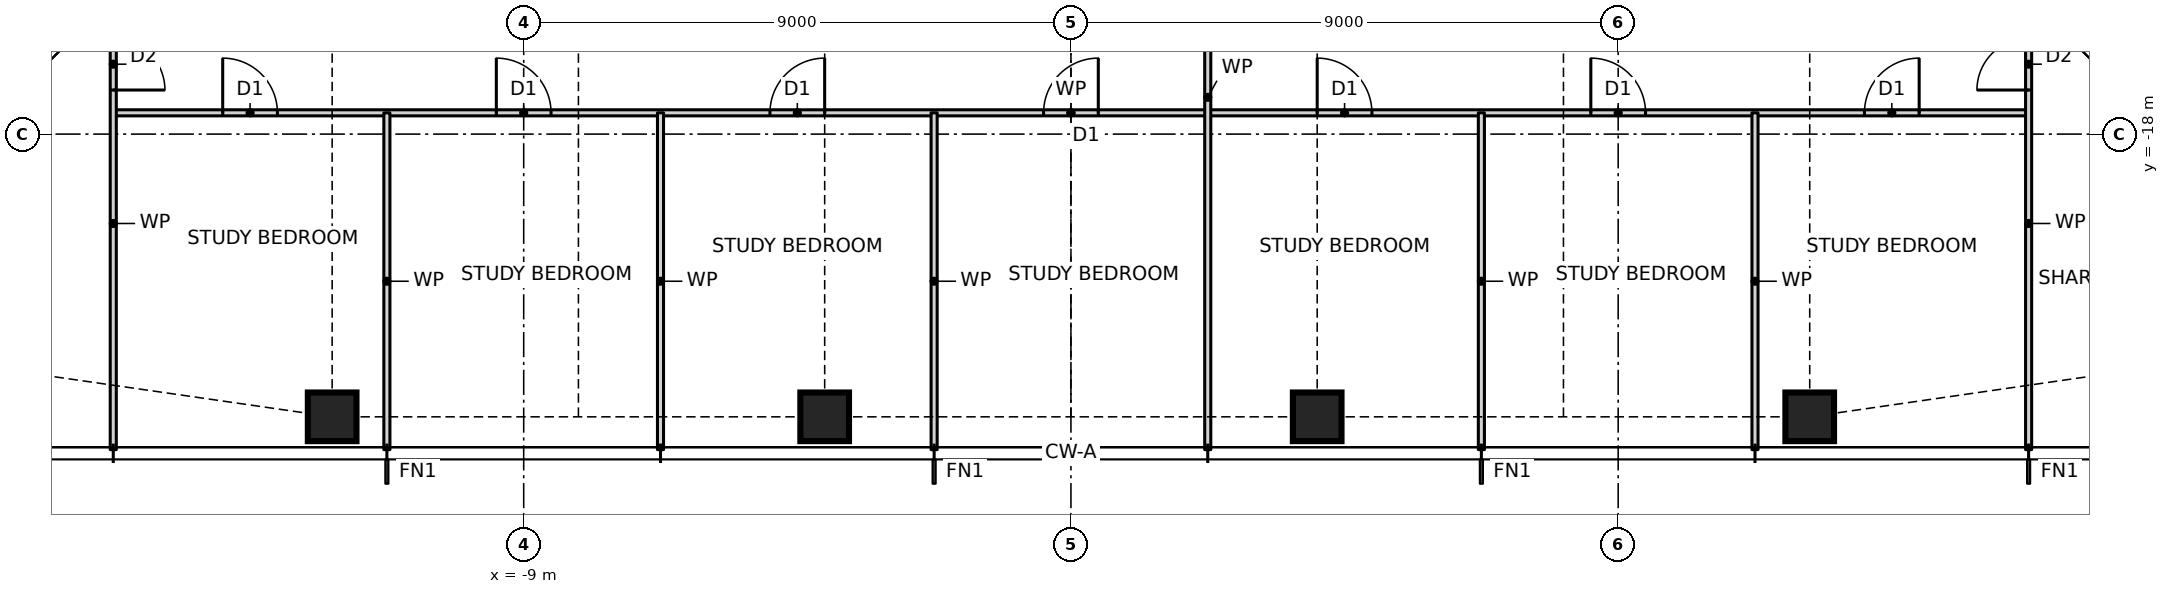
"""IFC4 building model, lengths in metres.
Left out: names, types, materials, properties, quantities, classifications, styles, units other than length and angle.
Written with IfcOpenShell. Run it as: python <this file> out.ifc"""

import sys

from ifc_helpers import new_model, si_unit, direction, frame, frame_2d, origin, origin_2d, place, context, subcontext, project, spatial, rectangle, hollow_rectangle, extrude, element, fill, save


model = new_model("IFC4")
c1 = context("Model", 3, precision=1e-05, world=origin(), true_north=direction((0.0, 1.0)))
c2 = subcontext(c1, "Body", "Model", "MODEL_VIEW")
j1 = project(units=[si_unit("LENGTHUNIT", "METRE"), si_unit("PLANEANGLEUNIT", "RADIAN")], contexts=[c1])
p1 = place(None, origin())
s1 = spatial("IfcSite", under=j1, at=p1, CompositionType="ELEMENT")
p2 = place(p1, origin())
s2 = spatial("IfcBuilding", under=s1, at=p2, CompositionType="ELEMENT")
p3 = place(p2, frame((0.0, 0.0, 57.0)))
s3 = spatial("IfcBuildingStorey", under=s2, at=p3, CompositionType="ELEMENT", Elevation=57.0)
for number, where, z_axis, x_axis in (
    (1, (-12.15, -22.65, 0.0), (0.0, 0.0, 1.0), (1.0, 0.0, 0.0)),
    (2, (-4.05, -22.65, 0.0), (0.0, 0.0, 1.0), (1.0, 0.0, 0.0)),
    (3, (4.05, -22.65, 0.0), (0.0, 0.0, 1.0), (1.0, 0.0, 0.0)),
    (4, (12.15, -22.65, 0.0), (0.0, 0.0, 1.0), (1.0, 0.0, 0.0)),
):
    element("IfcColumn", number, at=place(p3, frame(where, z_axis=z_axis, x_axis=x_axis)), inside=s3, PredefinedType="COLUMN", context=c2, shape_type="SweptSolid", body=[
        extrude(hollow_rectangle(XDim=0.8, YDim=0.8, WallThickness=0.09, at=origin_2d()), origin(), (0.0, 0.0, 1.0), 3.5),
    ])
p4 = place(p3, frame((-15.75, -17.65, 0.0), z_axis=(0.0, 0.0, 1.0), x_axis=(1.0, 0.0, 0.0)))
e5 = element("IfcWall", 5, at=p4, inside=s3, PredefinedType="PARTITIONING", context=c2, shape_type="SweptSolid", body=[
    extrude(rectangle(XDim=31.5, YDim=0.1, at=frame_2d((15.75, 0.0))), origin(), (0.0, 0.0, 1.0), 3.27),
])
p5 = place(p4, frame((1.8, 0.0, 0.0)))
e6 = element("IfcOpeningElement", 6, at=p5, cuts=e5, PredefinedType="OPENING", context=c2, shape_type="SweptSolid", body=[
    extrude(rectangle(XDim=0.9, YDim=2.1, at=frame_2d((0.45, 1.05))), frame((0.0, 0.06, 0.0), z_axis=(0.0, -1.0, 0.0), x_axis=(1.0, 0.0, 0.0)), (0.0, 0.0, 1.0), 0.12),
])
p6 = place(p4, frame((6.3, 0.0, 0.0)))
e7 = element("IfcOpeningElement", 7, at=p6, cuts=e5, PredefinedType="OPENING", context=c2, shape_type="SweptSolid", body=[
    extrude(rectangle(XDim=0.9, YDim=2.1, at=frame_2d((0.45, 1.05))), frame((0.0, 0.06, 0.0), z_axis=(0.0, -1.0, 0.0), x_axis=(1.0, 0.0, 0.0)), (0.0, 0.0, 1.0), 0.12),
])
p7 = place(p4, frame((10.8, 0.0, 0.0)))
e8 = element("IfcOpeningElement", 8, at=p7, cuts=e5, PredefinedType="OPENING", context=c2, shape_type="SweptSolid", body=[
    extrude(rectangle(XDim=0.9, YDim=2.1, at=frame_2d((0.45, 1.05))), frame((0.0, 0.06, 0.0), z_axis=(0.0, -1.0, 0.0), x_axis=(1.0, 0.0, 0.0)), (0.0, 0.0, 1.0), 0.12),
])
p8 = place(p4, frame((15.3, 0.0, 0.0)))
e9 = element("IfcOpeningElement", 9, at=p8, cuts=e5, PredefinedType="OPENING", context=c2, shape_type="SweptSolid", body=[
    extrude(rectangle(XDim=0.9, YDim=2.1, at=frame_2d((0.45, 1.05))), frame((0.0, 0.06, 0.0), z_axis=(0.0, -1.0, 0.0), x_axis=(1.0, 0.0, 0.0)), (0.0, 0.0, 1.0), 0.12),
])
p9 = place(p4, frame((19.8, 0.0, 0.0)))
e10 = element("IfcOpeningElement", 10, at=p9, cuts=e5, PredefinedType="OPENING", context=c2, shape_type="SweptSolid", body=[
    extrude(rectangle(XDim=0.9, YDim=2.1, at=frame_2d((0.45, 1.05))), frame((0.0, 0.06, 0.0), z_axis=(0.0, -1.0, 0.0), x_axis=(1.0, 0.0, 0.0)), (0.0, 0.0, 1.0), 0.12),
])
p10 = place(p4, frame((24.3, 0.0, 0.0)))
e11 = element("IfcOpeningElement", 11, at=p10, cuts=e5, PredefinedType="OPENING", context=c2, shape_type="SweptSolid", body=[
    extrude(rectangle(XDim=0.9, YDim=2.1, at=frame_2d((0.45, 1.05))), frame((0.0, 0.06, 0.0), z_axis=(0.0, -1.0, 0.0), x_axis=(1.0, 0.0, 0.0)), (0.0, 0.0, 1.0), 0.12),
])
p11 = place(p4, frame((28.8, 0.0, 0.0)))
e12 = element("IfcOpeningElement", 12, at=p11, cuts=e5, PredefinedType="OPENING", context=c2, shape_type="SweptSolid", body=[
    extrude(rectangle(XDim=0.9, YDim=2.1, at=frame_2d((0.45, 1.05))), frame((0.0, 0.06, 0.0), z_axis=(0.0, -1.0, 0.0), x_axis=(1.0, 0.0, 0.0)), (0.0, 0.0, 1.0), 0.12),
])
p12 = place(p3, frame((15.75, -23.19, 0.0), z_axis=(0.0, 0.0, 1.0), x_axis=(0.0, 1.0, 0.0)))
e13 = element("IfcWall", 13, at=p12, inside=s3, PredefinedType="PARTITIONING", context=c2, shape_type="SweptSolid", body=[
    extrude(rectangle(XDim=7.44, YDim=0.1, at=frame_2d((3.72, 0.0))), origin(), (0.0, 0.0, 1.0), 3.27),
])
p13 = place(p12, frame((5.915, 0.0, 0.0)))
e14 = element("IfcOpeningElement", 14, at=p13, cuts=e13, PredefinedType="OPENING", context=c2, shape_type="SweptSolid", body=[
    extrude(rectangle(XDim=0.85, YDim=2.1, at=frame_2d((0.425, 1.05))), frame((0.0, 0.06, 0.0), z_axis=(0.0, -1.0, 0.0), x_axis=(1.0, 0.0, 0.0)), (0.0, 0.0, 1.0), 0.12),
])
for number, where, z_axis, x_axis in (
    (15, (11.25, -23.19, 0.0), (0.0, 0.0, 1.0), (0.0, 1.0, 0.0)),
    (16, (6.75, -23.19, 0.0), (0.0, 0.0, 1.0), (0.0, 1.0, 0.0)),
):
    element("IfcWall", number, at=place(p3, frame(where, z_axis=z_axis, x_axis=x_axis)), inside=s3, PredefinedType="PARTITIONING", context=c2, shape_type="SweptSolid", body=[
        extrude(rectangle(XDim=5.54, YDim=0.1, at=frame_2d((2.77, 0.0))), origin(), (0.0, 0.0, 1.0), 3.27),
    ])
p14 = place(p3, frame((2.25, -23.19, 0.0), z_axis=(0.0, 0.0, 1.0), x_axis=(0.0, 1.0, 0.0)))
e17 = element("IfcWall", 17, at=p14, inside=s3, PredefinedType="PARTITIONING", context=c2, shape_type="SweptSolid", body=[
    extrude(rectangle(XDim=11.59, YDim=0.1, at=frame_2d((5.795, 0.0))), origin(), (0.0, 0.0, 1.0), 3.27),
])
for number, where, z_axis, x_axis in (
    (18, (-2.25, -23.19, 0.0), (0.0, 0.0, 1.0), (0.0, 1.0, 0.0)),
    (19, (-6.75, -23.19, 0.0), (0.0, 0.0, 1.0), (0.0, 1.0, 0.0)),
    (20, (-11.25, -23.19, 0.0), (0.0, 0.0, 1.0), (0.0, 1.0, 0.0)),
):
    element("IfcWall", number, at=place(p3, frame(where, z_axis=z_axis, x_axis=x_axis)), inside=s3, PredefinedType="PARTITIONING", context=c2, shape_type="SweptSolid", body=[
        extrude(rectangle(XDim=5.54, YDim=0.1, at=frame_2d((2.77, 0.0))), origin(), (0.0, 0.0, 1.0), 3.27),
    ])
p15 = place(p3, frame((-15.75, -23.19, 0.0), z_axis=(0.0, 0.0, 1.0), x_axis=(0.0, 1.0, 0.0)))
e21 = element("IfcWall", 21, at=p15, inside=s3, PredefinedType="PARTITIONING", context=c2, shape_type="SweptSolid", body=[
    extrude(rectangle(XDim=7.44, YDim=0.1, at=frame_2d((3.72, 0.0))), origin(), (0.0, 0.0, 1.0), 3.27),
])
p16 = place(p15, frame((5.915, 0.0, 0.0)))
e22 = element("IfcOpeningElement", 22, at=p16, cuts=e21, PredefinedType="OPENING", context=c2, shape_type="SweptSolid", body=[
    extrude(rectangle(XDim=0.85, YDim=2.1, at=frame_2d((0.425, 1.05))), frame((0.0, 0.06, 0.0), z_axis=(0.0, -1.0, 0.0), x_axis=(1.0, 0.0, 0.0)), (0.0, 0.0, 1.0), 0.12),
])
p17 = place(p5, origin())
e23 = element("IfcDoor", 23, at=p17, inside=s3, OperationType="SINGLE_SWING_LEFT", PredefinedType="DOOR", context=c2, shape_type="SweptSolid", body=[
    extrude(rectangle(XDim=0.9, YDim=2.1, at=frame_2d((0.45, 1.05))), frame((0.0, 0.025, 0.0), z_axis=(0.0, -1.0, 0.0), x_axis=(1.0, 0.0, 0.0)), (0.0, 0.0, 1.0), 0.05),
])
fill(e6, e23)
p18 = place(p6, origin())
e24 = element("IfcDoor", 24, at=p18, inside=s3, OperationType="SINGLE_SWING_LEFT", PredefinedType="DOOR", context=c2, shape_type="SweptSolid", body=[
    extrude(rectangle(XDim=0.9, YDim=2.1, at=frame_2d((0.45, 1.05))), frame((0.0, 0.025, 0.0), z_axis=(0.0, -1.0, 0.0), x_axis=(1.0, 0.0, 0.0)), (0.0, 0.0, 1.0), 0.05),
])
fill(e7, e24)
p19 = place(p7, origin())
e25 = element("IfcDoor", 25, at=p19, inside=s3, OperationType="SINGLE_SWING_RIGHT", PredefinedType="DOOR", context=c2, shape_type="SweptSolid", body=[
    extrude(rectangle(XDim=0.9, YDim=2.1, at=frame_2d((0.45, 1.05))), frame((0.0, 0.025, 0.0), z_axis=(0.0, -1.0, 0.0), x_axis=(1.0, 0.0, 0.0)), (0.0, 0.0, 1.0), 0.05),
])
fill(e8, e25)
p20 = place(p8, origin())
e26 = element("IfcDoor", 26, at=p20, inside=s3, OperationType="SINGLE_SWING_RIGHT", PredefinedType="DOOR", context=c2, shape_type="SweptSolid", body=[
    extrude(rectangle(XDim=0.9, YDim=2.1, at=frame_2d((0.45, 1.05))), frame((0.0, 0.025, 0.0), z_axis=(0.0, -1.0, 0.0), x_axis=(1.0, 0.0, 0.0)), (0.0, 0.0, 1.0), 0.05),
])
fill(e9, e26)
p21 = place(p9, origin())
e27 = element("IfcDoor", 27, at=p21, inside=s3, OperationType="SINGLE_SWING_LEFT", PredefinedType="DOOR", context=c2, shape_type="SweptSolid", body=[
    extrude(rectangle(XDim=0.9, YDim=2.1, at=frame_2d((0.45, 1.05))), frame((0.0, 0.025, 0.0), z_axis=(0.0, -1.0, 0.0), x_axis=(1.0, 0.0, 0.0)), (0.0, 0.0, 1.0), 0.05),
])
fill(e10, e27)
p22 = place(p10, origin())
e28 = element("IfcDoor", 28, at=p22, inside=s3, OperationType="SINGLE_SWING_LEFT", PredefinedType="DOOR", context=c2, shape_type="SweptSolid", body=[
    extrude(rectangle(XDim=0.9, YDim=2.1, at=frame_2d((0.45, 1.05))), frame((0.0, 0.025, 0.0), z_axis=(0.0, -1.0, 0.0), x_axis=(1.0, 0.0, 0.0)), (0.0, 0.0, 1.0), 0.05),
])
fill(e11, e28)
p23 = place(p11, origin())
e29 = element("IfcDoor", 29, at=p23, inside=s3, OperationType="SINGLE_SWING_RIGHT", PredefinedType="DOOR", context=c2, shape_type="SweptSolid", body=[
    extrude(rectangle(XDim=0.9, YDim=2.1, at=frame_2d((0.45, 1.05))), frame((0.0, 0.025, 0.0), z_axis=(0.0, -1.0, 0.0), x_axis=(1.0, 0.0, 0.0)), (0.0, 0.0, 1.0), 0.05),
])
fill(e12, e29)
p24 = place(p16, frame((0.85, 0.0, 0.0), z_axis=(0.0, 0.0, 1.0), x_axis=(-1.0, 0.0, 0.0)))
e30 = element("IfcDoor", 30, at=p24, inside=s3, OperationType="SINGLE_SWING_RIGHT", PredefinedType="DOOR", context=c2, shape_type="SweptSolid", body=[
    extrude(rectangle(XDim=0.85, YDim=2.1, at=frame_2d((0.425, 1.05))), frame((0.0, 0.025, 0.0), z_axis=(0.0, -1.0, 0.0), x_axis=(1.0, 0.0, 0.0)), (0.0, 0.0, 1.0), 0.05),
])
fill(e22, e30)
p25 = place(p13, origin())
e31 = element("IfcDoor", 31, at=p25, inside=s3, OperationType="SINGLE_SWING_LEFT", PredefinedType="DOOR", context=c2, shape_type="SweptSolid", body=[
    extrude(rectangle(XDim=0.85, YDim=2.1, at=frame_2d((0.425, 1.05))), frame((0.0, 0.025, 0.0), z_axis=(0.0, -1.0, 0.0), x_axis=(1.0, 0.0, 0.0)), (0.0, 0.0, 1.0), 0.05),
])
fill(e14, e31)
save(model, sys.argv[1])
